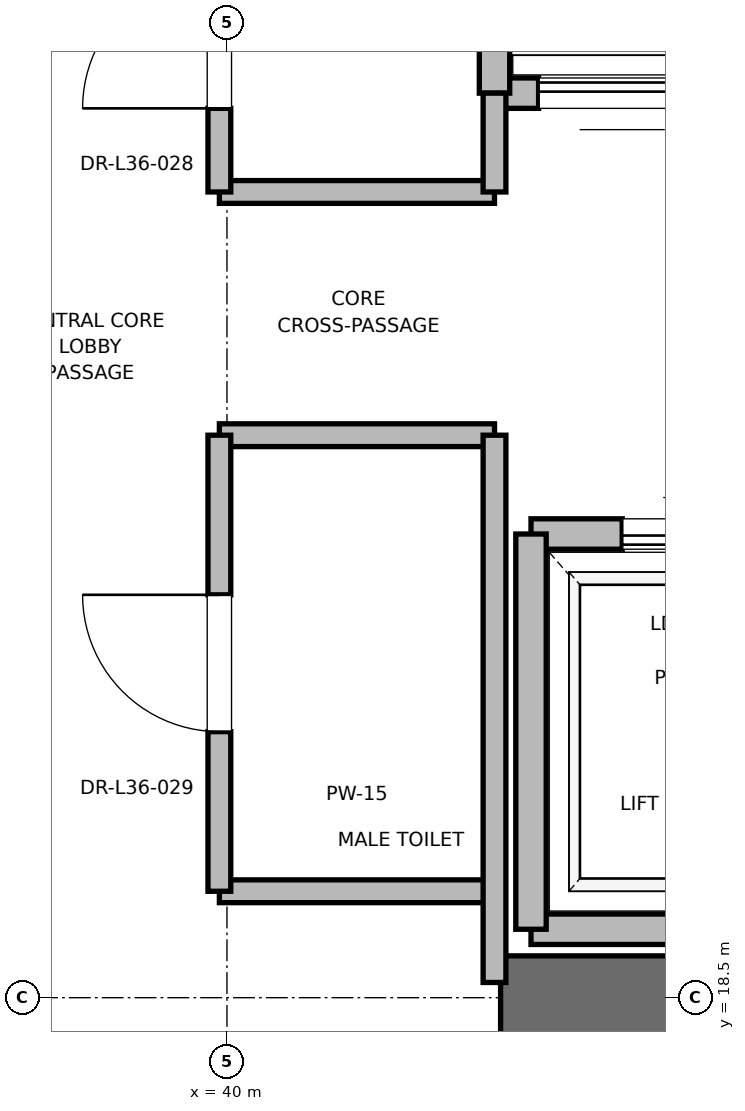
"""IFC4 building model, lengths in metres.
Left out: names, types, materials, properties, quantities, classifications, styles, units other than length and angle.
Written with IfcOpenShell. Run it as: python <this file> out.ifc"""

import sys

from ifc_helpers import new_model, si_unit, direction, frame, frame_2d, origin, place, context, subcontext, project, spatial, rectangle, extrude, element, fill, save


model = new_model("IFC4")
c1 = context("Model", 3, precision=1e-05, world=origin(), true_north=direction((0.0, 1.0)))
c2 = subcontext(c1, "Body", "Model", "MODEL_VIEW")
j1 = project(units=[si_unit("LENGTHUNIT", "METRE"), si_unit("PLANEANGLEUNIT", "RADIAN")], contexts=[c1])
p1 = place(None, origin())
s1 = spatial("IfcSite", under=j1, at=p1, CompositionType="ELEMENT")
p2 = place(p1, origin())
s2 = spatial("IfcBuilding", under=s1, at=p2, CompositionType="ELEMENT")
p3 = place(p2, frame((0.0, 0.0, 156.4)))
s3 = spatial("IfcBuildingStorey", under=s2, at=p3, CompositionType="ELEMENT", Elevation=156.4)
p4 = place(p3, frame((41.8, 18.5, 0.0), z_axis=(0.0, 0.0, 1.0), x_axis=(1.0, 0.0, 0.0)))
e1 = element("IfcWall", 1, at=p4, inside=s3, PredefinedType="SHEAR", context=c2, shape_type="SweptSolid", body=[
    extrude(rectangle(XDim=9.2, YDim=0.55, at=frame_2d((4.6, 0.0))), origin(), (0.0, 0.0, 1.0), 3.775),
])
p5 = place(p3, frame((42.0, 18.95, 0.0), z_axis=(0.0, 0.0, 1.0), x_axis=(1.0, 0.0, 0.0)))
e2 = element("IfcWall", 2, at=p5, inside=s3, PredefinedType="SOLIDWALL", context=c2, shape_type="SweptSolid", body=[
    extrude(rectangle(XDim=2.3, YDim=0.2, at=frame_2d((1.15, 0.0))), origin(), (0.0, 0.0, 1.0), 2.755),
])
p6 = place(p3, frame((44.3, 21.55, 0.0), z_axis=(0.0, 0.0, 1.0), x_axis=(-1.0, 0.0, 0.0)))
e3 = element("IfcWall", 3, at=p6, inside=s3, PredefinedType="SOLIDWALL", context=c2, shape_type="SweptSolid", body=[
    extrude(rectangle(XDim=2.3, YDim=0.2, at=frame_2d((1.15, 0.0))), origin(), (0.0, 0.0, 1.0), 3.775),
])
p7 = place(p6, frame((0.6, 0.0, 0.0)))
e4 = element("IfcOpeningElement", 4, at=p7, cuts=e3, PredefinedType="OPENING", context=c2, shape_type="SweptSolid", body=[
    extrude(rectangle(XDim=1.1, YDim=2.2, at=frame_2d((0.55, 1.1))), frame((0.0, 0.1, 0.0), z_axis=(0.0, -1.0, 0.0), x_axis=(1.0, 0.0, 0.0)), (0.0, 0.0, 1.0), 0.2),
])
p8 = place(p3, frame((42.0, 21.55, 0.0), z_axis=(0.0, 0.0, 1.0), x_axis=(0.0, -1.0, 0.0)))
e5 = element("IfcWall", 5, at=p8, inside=s3, PredefinedType="SOLIDWALL", context=c2, shape_type="SweptSolid", body=[
    extrude(rectangle(XDim=2.6, YDim=0.2, at=frame_2d((1.3, 0.0))), origin(), (0.0, 0.0, 1.0), 2.755),
])
p9 = place(p3, frame((41.76, 24.45, 0.0), z_axis=(0.0, 0.0, 1.0), x_axis=(1.0, 0.0, 0.0)))
e6 = element("IfcWall", 6, at=p9, inside=s3, PredefinedType="SOLIDWALL", context=c2, shape_type="SweptSolid", body=[
    extrude(rectangle(XDim=1.68, YDim=0.2, at=frame_2d((0.84, 0.0))), origin(), (0.0, 0.0, 1.0), 3.775),
])
p10 = place(p9, frame((0.29, 0.0, 0.0)))
e7 = element("IfcOpeningElement", 7, at=p10, cuts=e6, PredefinedType="OPENING", context=c2, shape_type="SweptSolid", body=[
    extrude(rectangle(XDim=1.1, YDim=2.2, at=frame_2d((0.55, 1.1))), frame((0.0, 0.1, 0.0), z_axis=(0.0, -1.0, 0.0), x_axis=(1.0, 0.0, 0.0)), (0.0, 0.0, 1.0), 0.2),
])
p11 = place(p3, frame((41.76, 27.05, 0.0), z_axis=(0.0, 0.0, 1.0), x_axis=(0.0, -1.0, 0.0)))
e8 = element("IfcWall", 8, at=p11, inside=s3, PredefinedType="SOLIDWALL", context=c2, shape_type="SweptSolid", body=[
    extrude(rectangle(XDim=2.6, YDim=0.2, at=frame_2d((1.3, 0.0))), origin(), (0.0, 0.0, 1.0), 3.775),
])
for number, where, z_axis, x_axis in (
    (9, (39.95, 19.2, 0.0), (0.0, 0.0, 1.0), (1.0, 0.0, 0.0)),
    (10, (39.95, 22.2, 0.0), (0.0, 0.0, 1.0), (1.0, 0.0, 0.0)),
    (11, (39.95, 23.8, 0.0), (0.0, 0.0, 1.0), (1.0, 0.0, 0.0)),
):
    element("IfcWall", number, at=place(p3, frame(where, z_axis=z_axis, x_axis=x_axis)), inside=s3, PredefinedType="PARTITIONING", context=c2, shape_type="SweptSolid", body=[
        extrude(rectangle(XDim=1.81, YDim=0.15, at=frame_2d((0.905, 0.0))), origin(), (0.0, 0.0, 1.0), 2.85),
    ])
p12 = place(p3, frame((41.76, 18.6, 0.0), z_axis=(0.0, 0.0, 1.0), x_axis=(0.0, 1.0, 0.0)))
e12 = element("IfcWall", 12, at=p12, inside=s3, PredefinedType="PARTITIONING", context=c2, shape_type="SweptSolid", body=[
    extrude(rectangle(XDim=3.6, YDim=0.15, at=frame_2d((1.8, 0.0))), origin(), (0.0, 0.0, 1.0), 2.755),
])
p13 = place(p3, frame((41.76, 23.8, 0.0), z_axis=(0.0, 0.0, 1.0), x_axis=(0.0, 1.0, 0.0)))
e13 = element("IfcWall", 13, at=p13, inside=s3, PredefinedType="PARTITIONING", context=c2, shape_type="SweptSolid", body=[
    extrude(rectangle(XDim=0.65, YDim=0.15, at=frame_2d((0.325, 0.0))), origin(), (0.0, 0.0, 1.0), 2.85),
])
p14 = place(p3, frame((39.95, 19.2, 0.0), z_axis=(0.0, 0.0, 1.0), x_axis=(0.0, 1.0, 0.0)))
e14 = element("IfcWall", 14, at=p14, inside=s3, PredefinedType="PARTITIONING", context=c2, shape_type="SweptSolid", body=[
    extrude(rectangle(XDim=3.0, YDim=0.15, at=frame_2d((1.5, 0.0))), origin(), (0.0, 0.0, 1.0), 2.85),
])
p15 = place(p14, frame((1.05, 0.0, 0.0)))
e15 = element("IfcOpeningElement", 15, at=p15, cuts=e14, PredefinedType="OPENING", context=c2, shape_type="SweptSolid", body=[
    extrude(rectangle(XDim=0.9, YDim=2.1, at=frame_2d((0.45, 1.05))), frame((0.0, 0.075, 0.0), z_axis=(0.0, -1.0, 0.0), x_axis=(1.0, 0.0, 0.0)), (0.0, 0.0, 1.0), 0.15),
])
p16 = place(p3, frame((39.95, 23.8, 0.0), z_axis=(0.0, 0.0, 1.0), x_axis=(0.0, 1.0, 0.0)))
e16 = element("IfcWall", 16, at=p16, inside=s3, PredefinedType="PARTITIONING", context=c2, shape_type="SweptSolid", body=[
    extrude(rectangle(XDim=2.0, YDim=0.15, at=frame_2d((1.0, 0.0))), origin(), (0.0, 0.0, 1.0), 2.85),
])
p17 = place(p16, frame((0.55, 0.0, 0.0)))
e17 = element("IfcOpeningElement", 17, at=p17, cuts=e16, PredefinedType="OPENING", context=c2, shape_type="SweptSolid", body=[
    extrude(rectangle(XDim=0.9, YDim=2.1, at=frame_2d((0.45, 1.05))), frame((0.0, 0.075, 0.0), z_axis=(0.0, -1.0, 0.0), x_axis=(1.0, 0.0, 0.0)), (0.0, 0.0, 1.0), 0.15),
])
p18 = place(p7, origin())
e18 = element("IfcDoor", 18, at=p18, inside=s3, OperationType="SLIDING_TO_RIGHT", PredefinedType="DOOR", context=c2, shape_type="SweptSolid", body=[
    extrude(rectangle(XDim=1.1, YDim=2.2, at=frame_2d((0.55, 1.1))), frame((0.0, 0.025, 0.0), z_axis=(0.0, -1.0, 0.0), x_axis=(1.0, 0.0, 0.0)), (0.0, 0.0, 1.0), 0.05),
])
fill(e4, e18)
p19 = place(p10, origin())
e19 = element("IfcDoor", 19, at=p19, inside=s3, OperationType="SLIDING_TO_RIGHT", PredefinedType="DOOR", context=c2, shape_type="SweptSolid", body=[
    extrude(rectangle(XDim=1.1, YDim=2.2, at=frame_2d((0.55, 1.1))), frame((0.0, 0.025, 0.0), z_axis=(0.0, -1.0, 0.0), x_axis=(1.0, 0.0, 0.0)), (0.0, 0.0, 1.0), 0.05),
])
fill(e7, e19)
p20 = place(p15, origin())
e20 = element("IfcDoor", 20, at=p20, inside=s3, OperationType="SINGLE_SWING_RIGHT", PredefinedType="DOOR", context=c2, shape_type="SweptSolid", body=[
    extrude(rectangle(XDim=0.9, YDim=2.1, at=frame_2d((0.45, 1.05))), frame((0.0, 0.025, 0.0), z_axis=(0.0, -1.0, 0.0), x_axis=(1.0, 0.0, 0.0)), (0.0, 0.0, 1.0), 0.05),
])
fill(e15, e20)
p21 = place(p17, origin())
e21 = element("IfcDoor", 21, at=p21, inside=s3, OperationType="SINGLE_SWING_LEFT", PredefinedType="DOOR", context=c2, shape_type="SweptSolid", body=[
    extrude(rectangle(XDim=0.9, YDim=2.1, at=frame_2d((0.45, 1.05))), frame((0.0, 0.025, 0.0), z_axis=(0.0, -1.0, 0.0), x_axis=(1.0, 0.0, 0.0)), (0.0, 0.0, 1.0), 0.05),
])
fill(e17, e21)
save(model, sys.argv[1])
